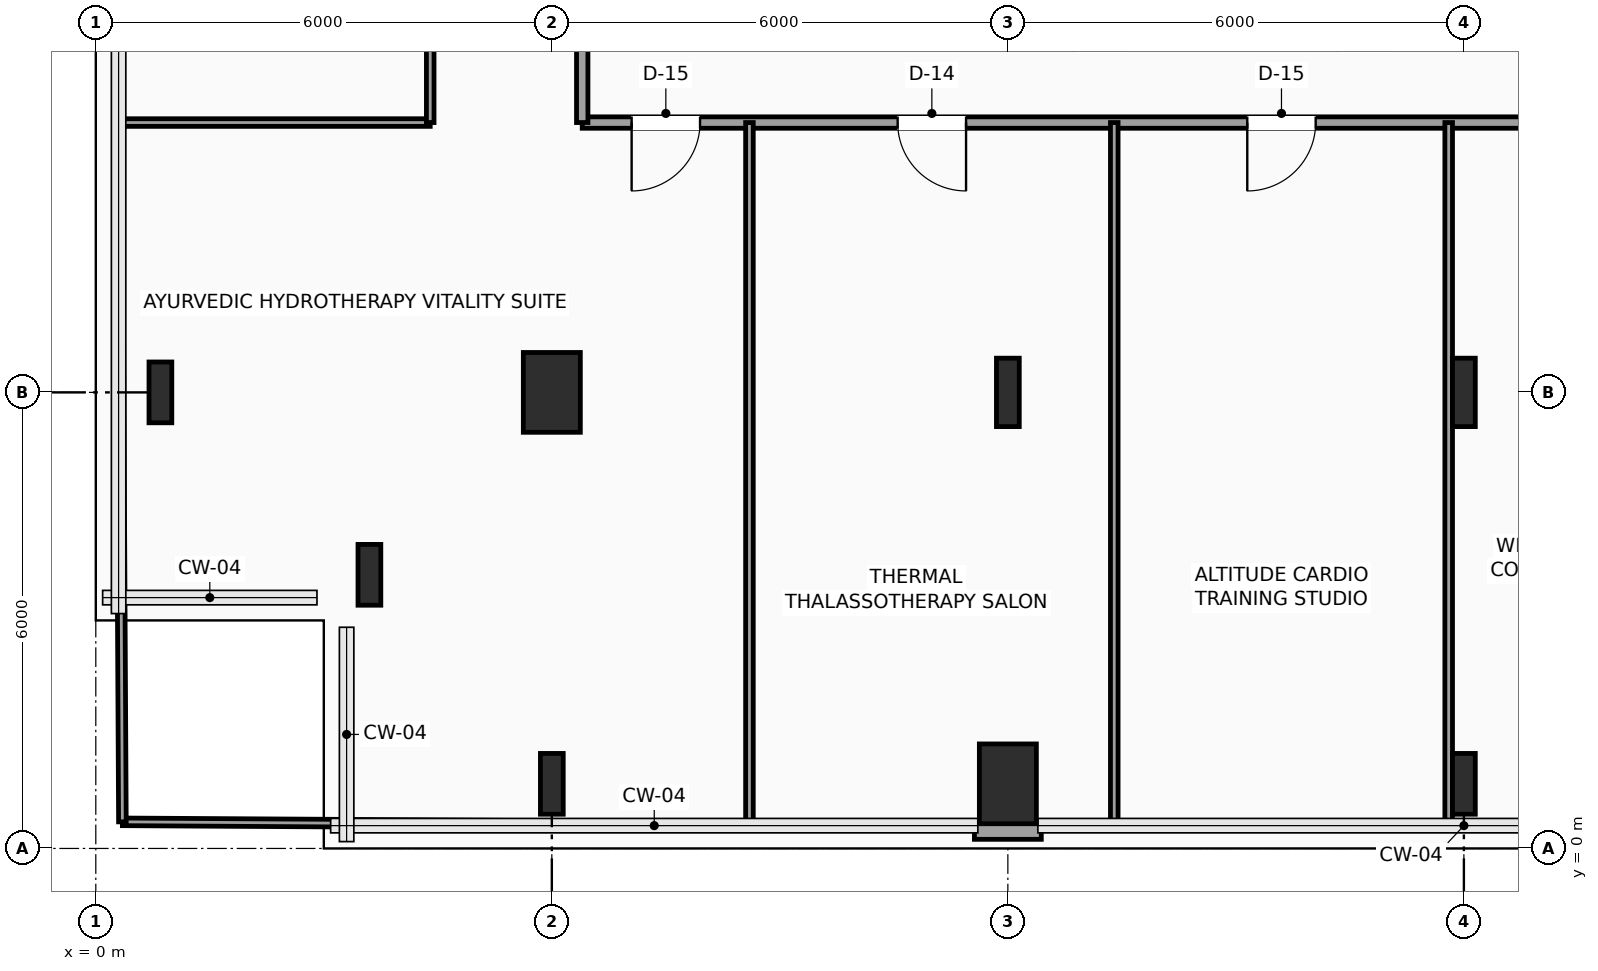
"""IFC4 building model, lengths in metres.
Left out: names, types, materials, properties, quantities, classifications, styles, units other than length and angle.
Written with IfcOpenShell. Run it as: python <this file> out.ifc"""

import sys

from ifc_helpers import new_model, si_unit, direction, frame, frame_2d, origin, origin_2d, place, context, subcontext, project, spatial, rectangle, i_section, extrude, element, fill, save


model = new_model("IFC4")
c1 = context("Model", 3, precision=1e-05, world=origin(), true_north=direction((0.0, 1.0)))
c2 = subcontext(c1, "Body", "Model", "MODEL_VIEW")
j1 = project(units=[si_unit("LENGTHUNIT", "METRE"), si_unit("PLANEANGLEUNIT", "RADIAN")], contexts=[c1])
p1 = place(None, origin())
s1 = spatial("IfcSite", under=j1, at=p1, CompositionType="ELEMENT")
p2 = place(p1, origin())
s2 = spatial("IfcBuilding", under=s1, at=p2, CompositionType="ELEMENT")
p3 = place(p2, frame((0.0, 0.0, 195.45)))
s3 = spatial("IfcBuildingStorey", under=s2, at=p3, CompositionType="ELEMENT", Elevation=195.45)
for number, where, z_axis, x_axis in (
    (1, (3.6, 3.6, 0.0), (0.0, 0.0, 1.0), (1.0, 0.0, 0.0)),
    (2, (0.85, 6.0, 0.0), (0.0, 0.0, 1.0), (1.0, 0.0, 0.0)),
    (3, (6.0, 0.85, 0.0), (0.0, 0.0, 1.0), (1.0, 0.0, 0.0)),
):
    element("IfcColumn", number, at=place(p3, frame(where, z_axis=z_axis, x_axis=x_axis)), inside=s3, PredefinedType="COLUMN", context=c2, shape_type="SweptSolid", body=[
        extrude(i_section(OverallWidth=0.3, OverallDepth=0.8, WebThickness=0.018, FlangeThickness=0.033, FilletRadius=0.03, at=origin_2d()), origin(), (0.0, 0.0, 1.0), 3.75),
    ])
for number, where, z_axis, x_axis in (
    (4, (6.0, 6.0, 0.0), (0.0, 0.0, 1.0), (1.0, 0.0, 0.0)),
    (5, (12.0, 0.85, 0.0), (0.0, 0.0, 1.0), (1.0, 0.0, 0.0)),
):
    element("IfcColumn", number, at=place(p3, frame(where, z_axis=z_axis, x_axis=x_axis)), inside=s3, PredefinedType="COLUMN", context=c2, shape_type="SweptSolid", body=[
        extrude(rectangle(XDim=0.75, YDim=1.05, at=origin_2d()), origin(), (0.0, 0.0, 1.0), 3.75),
    ])
p4 = place(p3, frame((12.0, 6.0, 0.0), z_axis=(0.0, 0.0, 1.0), x_axis=(1.0, 0.0, 0.0)))
e6 = element("IfcColumn", 6, at=p4, inside=s3, PredefinedType="COLUMN", context=c2, shape_type="SweptSolid", body=[
    extrude(i_section(OverallWidth=0.3, OverallDepth=0.9, WebThickness=0.019, FlangeThickness=0.035, FilletRadius=0.03, at=origin_2d()), origin(), (0.0, 0.0, 1.0), 3.75),
])
p5 = place(p3, frame((18.0, 0.85, 0.0), z_axis=(0.0, 0.0, 1.0), x_axis=(1.0, 0.0, 0.0)))
e7 = element("IfcColumn", 7, at=p5, inside=s3, PredefinedType="COLUMN", context=c2, shape_type="SweptSolid", body=[
    extrude(i_section(OverallWidth=0.3, OverallDepth=0.8, WebThickness=0.018, FlangeThickness=0.033, FilletRadius=0.03, at=origin_2d()), origin(), (0.0, 0.0, 1.0), 3.75),
])
p6 = place(p3, frame((18.0, 6.0, 0.0), z_axis=(0.0, 0.0, 1.0), x_axis=(1.0, 0.0, 0.0)))
e8 = element("IfcColumn", 8, at=p6, inside=s3, PredefinedType="COLUMN", context=c2, shape_type="SweptSolid", body=[
    extrude(i_section(OverallWidth=0.3, OverallDepth=0.9, WebThickness=0.019, FlangeThickness=0.035, FilletRadius=0.03, at=origin_2d()), origin(), (0.0, 0.0, 1.0), 3.75),
])
p7 = place(p3, frame((12.44, 0.24, 0.0), z_axis=(0.0, 0.0, 1.0), x_axis=(-1.0, 0.0, 0.0)))
e9 = element("IfcWall", 9, at=p7, inside=s3, PredefinedType="SOLIDWALL", context=c2, shape_type="SweptSolid", body=[
    extrude(rectangle(XDim=0.88, YDim=0.24, at=frame_2d((0.44, 0.0))), origin(), (0.0, 0.0, 1.0), 3.475),
])
p8 = place(p3, frame((21.95, 9.55, 0.0), z_axis=(0.0, 0.0, 1.0), x_axis=(-1.0, 0.0, 0.0)))
e10 = element("IfcWall", 10, at=p8, inside=s3, PredefinedType="PARTITIONING", context=c2, shape_type="SweptSolid", body=[
    extrude(rectangle(XDim=15.55, YDim=0.15, at=frame_2d((7.775, 0.0))), origin(), (0.0, 0.0, 1.0), 3.475),
])
p9 = place(p8, frame((14.0, 0.0, 0.0)))
e11 = element("IfcOpeningElement", 11, at=p9, cuts=e10, PredefinedType="OPENING", context=c2, shape_type="SweptSolid", body=[
    extrude(rectangle(XDim=0.9, YDim=2.1, at=frame_2d((0.45, 1.05))), frame((0.0, 0.085, 0.0), z_axis=(0.0, -1.0, 0.0), x_axis=(1.0, 0.0, 0.0)), (0.0, 0.0, 1.0), 0.17),
])
p10 = place(p8, frame((10.5, 0.0, 0.0)))
e12 = element("IfcOpeningElement", 12, at=p10, cuts=e10, PredefinedType="OPENING", context=c2, shape_type="SweptSolid", body=[
    extrude(rectangle(XDim=0.9, YDim=2.1, at=frame_2d((0.45, 1.05))), frame((0.0, 0.085, 0.0), z_axis=(0.0, -1.0, 0.0), x_axis=(1.0, 0.0, 0.0)), (0.0, 0.0, 1.0), 0.17),
])
p11 = place(p8, frame((5.9, 0.0, 0.0)))
e13 = element("IfcOpeningElement", 13, at=p11, cuts=e10, PredefinedType="OPENING", context=c2, shape_type="SweptSolid", body=[
    extrude(rectangle(XDim=0.9, YDim=2.1, at=frame_2d((0.45, 1.05))), frame((0.0, 0.085, 0.0), z_axis=(0.0, -1.0, 0.0), x_axis=(1.0, 0.0, 0.0)), (0.0, 0.0, 1.0), 0.17),
])
p12 = place(p8, frame((1.625, 0.0, 0.0)))
e14 = element("IfcOpeningElement", 14, at=p12, cuts=e10, PredefinedType="OPENING", context=c2, shape_type="SweptSolid", body=[
    extrude(rectangle(XDim=0.9, YDim=2.1, at=frame_2d((0.45, 1.05))), frame((0.0, 0.085, 0.0), z_axis=(0.0, -1.0, 0.0), x_axis=(1.0, 0.0, 0.0)), (0.0, 0.0, 1.0), 0.17),
])
p13 = place(p3, frame((6.4, 9.55, 0.0), z_axis=(0.0, 0.0, 1.0), x_axis=(0.0, 1.0, 0.0)))
e15 = element("IfcWall", 15, at=p13, inside=s3, PredefinedType="PARTITIONING", context=c2, shape_type="SweptSolid", body=[
    extrude(rectangle(XDim=1.7, YDim=0.15, at=frame_2d((0.85, 0.0))), origin(), (0.0, 0.0, 1.0), 3.475),
])
p14 = place(p3, frame((0.35, 0.35, 0.0), z_axis=(0.0, 0.0, 1.0), x_axis=(0.999981599147, -0.006066412992, 0.0)))
e16 = element("IfcWall", 16, at=p14, inside=s3, PredefinedType="PARTITIONING", context=c2, shape_type="SweptSolid", body=[
    extrude(rectangle(XDim=8.25, YDim=0.1, at=frame_2d((4.125, 0.0))), origin(), (0.0, 0.0, 1.0), 3.475),
])
p15 = place(p3, frame((0.35, 0.35, 0.0), z_axis=(0.0, 0.0, 1.0), x_axis=(-0.005440038388, 0.999985202882, 0.0)))
e17 = element("IfcWall", 17, at=p15, inside=s3, PredefinedType="PARTITIONING", context=c2, shape_type="SweptSolid", body=[
    extrude(rectangle(XDim=9.2, YDim=0.1, at=frame_2d((4.6, 0.0))), origin(), (0.0, 0.0, 1.0), 3.475),
])
for number, where, z_axis, x_axis in (
    (18, (8.6, 0.3, 0.0), (0.0, 0.0, 1.0), (0.0, 1.0, 0.0)),
    (19, (13.4, 0.3, 0.0), (0.0, 0.0, 1.0), (0.0, 1.0, 0.0)),
):
    element("IfcWall", number, at=place(p3, frame(where, z_axis=z_axis, x_axis=x_axis)), inside=s3, PredefinedType="PARTITIONING", context=c2, shape_type="SweptSolid", body=[
        extrude(rectangle(XDim=9.25, YDim=0.1, at=frame_2d((4.625, 0.0))), origin(), (0.0, 0.0, 1.0), 3.475),
    ])
p16 = place(p3, frame((17.8, 0.3, 0.0), z_axis=(0.0, 0.0, 1.0), x_axis=(0.0, 1.0, 0.0)))
e20 = element("IfcWall", 20, at=p16, inside=s3, PredefinedType="PARTITIONING", context=c2, shape_type="SweptSolid", body=[
    extrude(rectangle(XDim=9.25, YDim=0.1, at=frame_2d((4.625, 0.0))), origin(), (0.0, 0.0, 1.0), 3.067),
])
p17 = place(p3, frame((0.3, 9.55, 0.0), z_axis=(0.0, 0.0, 1.0), x_axis=(1.0, 0.0, 0.0)))
e21 = element("IfcWall", 21, at=p17, inside=s3, PredefinedType="PARTITIONING", context=c2, shape_type="SweptSolid", body=[
    extrude(rectangle(XDim=4.1, YDim=0.1, at=frame_2d((2.05, 0.0))), origin(), (0.0, 0.0, 1.0), 3.475),
])
p18 = place(p3, frame((4.4, 9.55, 0.0), z_axis=(0.0, 0.0, 1.0), x_axis=(0.0, 1.0, 0.0)))
e22 = element("IfcWall", 22, at=p18, inside=s3, PredefinedType="PARTITIONING", context=c2, shape_type="SweptSolid", body=[
    extrude(rectangle(XDim=6.7, YDim=0.1, at=frame_2d((3.35, 0.0))), origin(), (0.0, 0.0, 1.0), 3.475),
])
p19 = place(p9, origin())
e23 = element("IfcDoor", 23, at=p19, inside=s3, OperationType="SINGLE_SWING_RIGHT", PredefinedType="DOOR", context=c2, shape_type="SweptSolid", body=[
    extrude(rectangle(XDim=0.9, YDim=2.1, at=frame_2d((0.45, 1.05))), frame((0.0, 0.025, 0.0), z_axis=(0.0, -1.0, 0.0), x_axis=(1.0, 0.0, 0.0)), (0.0, 0.0, 1.0), 0.05),
])
fill(e11, e23)
p20 = place(p10, origin())
e24 = element("IfcDoor", 24, at=p20, inside=s3, OperationType="SINGLE_SWING_LEFT", PredefinedType="DOOR", context=c2, shape_type="SweptSolid", body=[
    extrude(rectangle(XDim=0.9, YDim=2.1, at=frame_2d((0.45, 1.05))), frame((0.0, 0.025, 0.0), z_axis=(0.0, -1.0, 0.0), x_axis=(1.0, 0.0, 0.0)), (0.0, 0.0, 1.0), 0.05),
])
fill(e12, e24)
p21 = place(p11, origin())
e25 = element("IfcDoor", 25, at=p21, inside=s3, OperationType="SINGLE_SWING_RIGHT", PredefinedType="DOOR", context=c2, shape_type="SweptSolid", body=[
    extrude(rectangle(XDim=0.9, YDim=2.1, at=frame_2d((0.45, 1.05))), frame((0.0, 0.025, 0.0), z_axis=(0.0, -1.0, 0.0), x_axis=(1.0, 0.0, 0.0)), (0.0, 0.0, 1.0), 0.05),
])
fill(e13, e25)
save(model, sys.argv[1])
